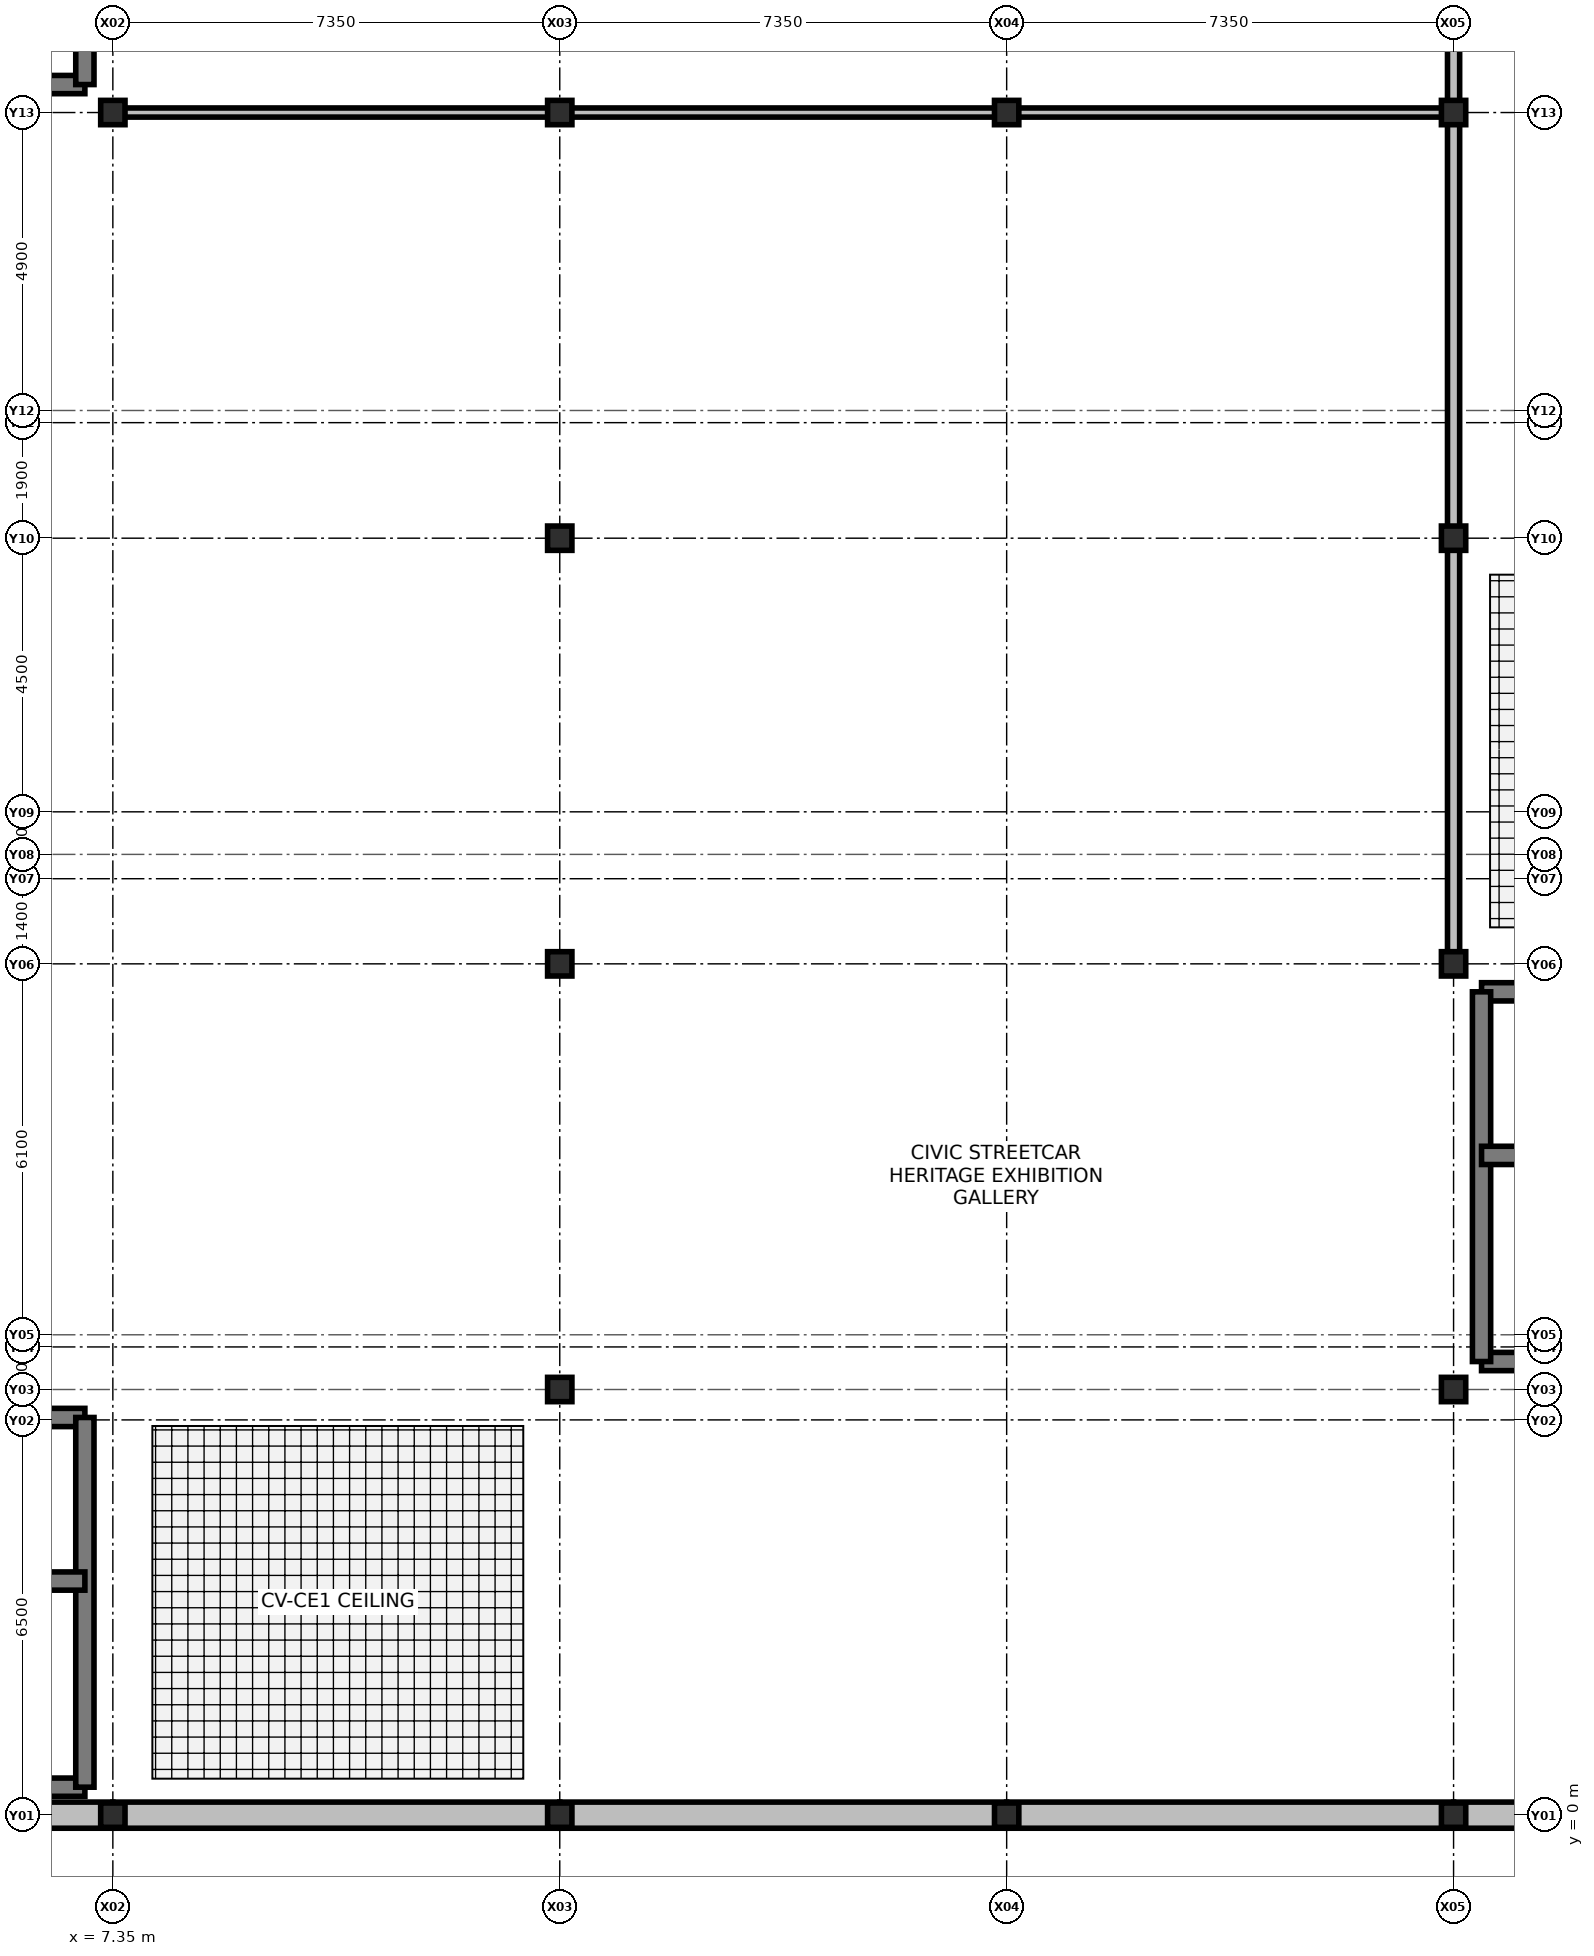
"""IFC4 building model, lengths in metres.
Left out: names, types, materials, properties, quantities, classifications, styles, units other than length and angle.
Written with IfcOpenShell. Run it as: python <this file> out.ifc"""

import sys

from ifc_helpers import new_model, si_unit, direction, frame, frame_2d, origin, origin_with_axes, origin_2d, place, context, subcontext, project, spatial, rectangle, i_section, extrude, element, fill, save


model = new_model("IFC4")
c1 = context("Model", 3, precision=1e-05, world=origin(), true_north=direction((0.0, 1.0)))
c2 = subcontext(c1, "Body", "Model", "MODEL_VIEW")
j1 = project(units=[si_unit("LENGTHUNIT", "METRE"), si_unit("PLANEANGLEUNIT", "RADIAN")], contexts=[c1])
p1 = place(None, origin())
s1 = spatial("IfcSite", under=j1, at=p1, CompositionType="ELEMENT")
p2 = place(p1, origin())
s2 = spatial("IfcBuilding", under=s1, at=p2, CompositionType="ELEMENT")
p3 = place(p2, origin())
s3 = spatial("IfcBuildingStorey", under=s2, at=p3, CompositionType="ELEMENT", Elevation=0.0)
for number, where, z_axis, x_axis in (
    (1, (7.35, 0.0, -0.35), (0.0, 0.0, 1.0), (1.0, 0.0, 0.0)),
    (2, (7.35, 28.0, -0.35), (0.0, 0.0, 1.0), (1.0, 0.0, 0.0)),
    (3, (14.7, 0.0, -0.35), (0.0, 0.0, 1.0), (1.0, 0.0, 0.0)),
    (4, (14.7, 7.0, -0.35), (0.0, 0.0, 1.0), (1.0, 0.0, 0.0)),
    (5, (14.7, 14.0, -0.35), (0.0, 0.0, 1.0), (1.0, 0.0, 0.0)),
    (6, (14.7, 21.0, -0.35), (0.0, 0.0, 1.0), (1.0, 0.0, 0.0)),
    (7, (14.7, 28.0, -0.35), (0.0, 0.0, 1.0), (1.0, 0.0, 0.0)),
    (8, (22.05, 0.0, -0.35), (0.0, 0.0, 1.0), (1.0, 0.0, 0.0)),
    (9, (22.05, 28.0, -0.35), (0.0, 0.0, 1.0), (1.0, 0.0, 0.0)),
    (10, (29.4, 0.0, -0.35), (0.0, 0.0, 1.0), (1.0, 0.0, 0.0)),
    (11, (29.4, 7.0, -0.35), (0.0, 0.0, 1.0), (1.0, 0.0, 0.0)),
    (12, (29.4, 14.0, -0.35), (0.0, 0.0, 1.0), (1.0, 0.0, 0.0)),
    (13, (29.4, 21.0, -0.35), (0.0, 0.0, 1.0), (1.0, 0.0, 0.0)),
    (14, (29.4, 28.0, -0.35), (0.0, 0.0, 1.0), (1.0, 0.0, 0.0)),
):
    element("IfcColumn", number, at=place(p3, frame(where, z_axis=z_axis, x_axis=x_axis)), inside=s3, PredefinedType="COLUMN", context=c2, shape_type="SweptSolid", body=[
        extrude(i_section(OverallWidth=0.4, OverallDepth=0.4, WebThickness=0.013, FlangeThickness=0.021, at=origin_2d()), origin(), (0.0, 0.0, 1.0), 6.35),
    ])
p4 = place(p3, origin_with_axes())
e15 = element("IfcWall", 15, at=p4, inside=s3, PredefinedType="SOLIDWALL", context=c2, shape_type="SweptSolid", body=[
    extrude(rectangle(XDim=7.35, YDim=0.43, at=frame_2d((3.675, 0.0))), origin(), (0.0, 0.0, 1.0), 5.15),
])
p5 = place(p3, frame((7.35, 0.0, 0.0), z_axis=(0.0, 0.0, 1.0), x_axis=(1.0, 0.0, 0.0)))
e16 = element("IfcWall", 16, at=p5, inside=s3, PredefinedType="SOLIDWALL", context=c2, shape_type="SweptSolid", body=[
    extrude(rectangle(XDim=7.35, YDim=0.43, at=frame_2d((3.675, 0.0))), origin(), (0.0, 0.0, 1.0), 5.15),
])
p6 = place(p5, frame((2.75, 0.0, 0.0)))
e17 = element("IfcOpeningElement", 17, at=p6, cuts=e16, PredefinedType="OPENING", context=c2, shape_type="SweptSolid", body=[
    extrude(rectangle(XDim=1.8, YDim=2.4, at=frame_2d((0.9, 1.2))), frame((0.0, 0.225, 0.0), z_axis=(0.0, -1.0, 0.0), x_axis=(1.0, 0.0, 0.0)), (0.0, 0.0, 1.0), 0.45),
])
for number, where, z_axis, x_axis in (
    (18, (14.7, 0.0, 0.0), (0.0, 0.0, 1.0), (1.0, 0.0, 0.0)),
    (19, (22.05, 0.0, 0.0), (0.0, 0.0, 1.0), (1.0, 0.0, 0.0)),
):
    element("IfcWall", number, at=place(p3, frame(where, z_axis=z_axis, x_axis=x_axis)), inside=s3, PredefinedType="SOLIDWALL", context=c2, shape_type="SweptSolid", body=[
        extrude(rectangle(XDim=7.35, YDim=0.43, at=frame_2d((3.675, 0.0))), origin(), (0.0, 0.0, 1.0), 5.15),
    ])
p7 = place(p3, frame((29.4, 0.0, 0.0), z_axis=(0.0, 0.0, 1.0), x_axis=(1.0, 0.0, 0.0)))
e20 = element("IfcWall", 20, at=p7, inside=s3, PredefinedType="SOLIDWALL", context=c2, shape_type="SweptSolid", body=[
    extrude(rectangle(XDim=7.35, YDim=0.43, at=frame_2d((3.675, 0.0))), origin(), (0.0, 0.0, 1.0), 5.15),
])
p8 = place(p7, frame((2.75, 0.0, 0.0)))
e21 = element("IfcOpeningElement", 21, at=p8, cuts=e20, PredefinedType="OPENING", context=c2, shape_type="SweptSolid", body=[
    extrude(rectangle(XDim=1.8, YDim=2.4, at=frame_2d((0.9, 1.2))), frame((0.0, 0.225, 0.0), z_axis=(0.0, -1.0, 0.0), x_axis=(1.0, 0.0, 0.0)), (0.0, 0.0, 1.0), 0.45),
])
p9 = place(p3, frame((0.46, 28.46, -0.35), z_axis=(0.0, 0.0, 1.0), x_axis=(1.0, 0.0, 0.0)))
e22 = element("IfcWall", 22, at=p9, inside=s3, PredefinedType="SHEAR", context=c2, shape_type="SweptSolid", body=[
    extrude(rectangle(XDim=6.43, YDim=0.3, at=frame_2d((3.215, 0.0))), origin(), (0.0, 0.0, 1.0), 6.07),
])
p10 = place(p3, frame((6.89, 28.46, -0.35), z_axis=(0.0, 0.0, 1.0), x_axis=(0.0, 1.0, 0.0)))
e23 = element("IfcWall", 23, at=p10, inside=s3, PredefinedType="SHEAR", context=c2, shape_type="SweptSolid", body=[
    extrude(rectangle(XDim=6.08, YDim=0.3, at=frame_2d((3.04, 0.0))), origin(), (0.0, 0.0, 1.0), 6.07),
])
p11 = place(p3, frame((29.86, 7.46, -0.35), z_axis=(0.0, 0.0, 1.0), x_axis=(1.0, 0.0, 0.0)))
e24 = element("IfcWall", 24, at=p11, inside=s3, PredefinedType="SHEAR", context=c2, shape_type="SweptSolid", body=[
    extrude(rectangle(XDim=6.43, YDim=0.3, at=frame_2d((3.215, 0.0))), origin(), (0.0, 0.0, 1.0), 6.07),
])
p12 = place(p3, frame((29.86, 13.54, -0.35), z_axis=(0.0, 0.0, 1.0), x_axis=(1.0, 0.0, 0.0)))
e25 = element("IfcWall", 25, at=p12, inside=s3, PredefinedType="SHEAR", context=c2, shape_type="SweptSolid", body=[
    extrude(rectangle(XDim=6.43, YDim=0.3, at=frame_2d((3.215, 0.0))), origin(), (0.0, 0.0, 1.0), 6.07),
])
p13 = place(p12, frame((0.55, 0.0, 0.35)))
e26 = element("IfcOpeningElement", 26, at=p13, cuts=e25, PredefinedType="OPENING", context=c2, shape_type="SweptSolid", body=[
    extrude(rectangle(XDim=1.5, YDim=2.2, at=frame_2d((0.75, 1.1))), frame((0.0, 0.16, 0.0), z_axis=(0.0, -1.0, 0.0), x_axis=(1.0, 0.0, 0.0)), (0.0, 0.0, 1.0), 0.32),
])
p14 = place(p3, frame((29.86, 7.46, -0.35), z_axis=(0.0, 0.0, 1.0), x_axis=(0.0, 1.0, 0.0)))
e27 = element("IfcWall", 27, at=p14, inside=s3, PredefinedType="SHEAR", context=c2, shape_type="SweptSolid", body=[
    extrude(rectangle(XDim=6.08, YDim=0.3, at=frame_2d((3.04, 0.0))), origin(), (0.0, 0.0, 1.0), 6.07),
])
p15 = place(p3, frame((29.86, 10.85, -0.35), z_axis=(0.0, 0.0, 1.0), x_axis=(1.0, 0.0, 0.0)))
e28 = element("IfcWall", 28, at=p15, inside=s3, PredefinedType="SHEAR", context=c2, shape_type="SweptSolid", body=[
    extrude(rectangle(XDim=6.43, YDim=0.3, at=frame_2d((3.215, 0.0))), origin(), (0.0, 0.0, 1.0), 6.07),
])
p16 = place(p15, frame((0.185, 0.0, 0.35)))
e29 = element("IfcOpeningElement", 29, at=p16, cuts=e28, PredefinedType="OPENING", context=c2, shape_type="SweptSolid", body=[
    extrude(rectangle(XDim=1.05, YDim=2.15, at=frame_2d((0.525, 1.075))), frame((0.0, 0.16, 0.0), z_axis=(0.0, -1.0, 0.0), x_axis=(1.0, 0.0, 0.0)), (0.0, 0.0, 1.0), 0.32),
])
p17 = place(p3, frame((0.46, 0.46, -0.35), z_axis=(0.0, 0.0, 1.0), x_axis=(1.0, 0.0, 0.0)))
e30 = element("IfcWall", 30, at=p17, inside=s3, PredefinedType="SHEAR", context=c2, shape_type="SweptSolid", body=[
    extrude(rectangle(XDim=6.43, YDim=0.3, at=frame_2d((3.215, 0.0))), origin(), (0.0, 0.0, 1.0), 6.07),
])
p18 = place(p3, frame((0.46, 6.54, -0.35), z_axis=(0.0, 0.0, 1.0), x_axis=(1.0, 0.0, 0.0)))
e31 = element("IfcWall", 31, at=p18, inside=s3, PredefinedType="SHEAR", context=c2, shape_type="SweptSolid", body=[
    extrude(rectangle(XDim=6.43, YDim=0.3, at=frame_2d((3.215, 0.0))), origin(), (0.0, 0.0, 1.0), 6.07),
])
p19 = place(p18, frame((0.55, 0.0, 0.35)))
e32 = element("IfcOpeningElement", 32, at=p19, cuts=e31, PredefinedType="OPENING", context=c2, shape_type="SweptSolid", body=[
    extrude(rectangle(XDim=1.5, YDim=2.2, at=frame_2d((0.75, 1.1))), frame((0.0, 0.16, 0.0), z_axis=(0.0, -1.0, 0.0), x_axis=(1.0, 0.0, 0.0)), (0.0, 0.0, 1.0), 0.32),
])
p20 = place(p3, frame((6.89, 0.46, -0.35), z_axis=(0.0, 0.0, 1.0), x_axis=(0.0, 1.0, 0.0)))
e33 = element("IfcWall", 33, at=p20, inside=s3, PredefinedType="SHEAR", context=c2, shape_type="SweptSolid", body=[
    extrude(rectangle(XDim=6.08, YDim=0.3, at=frame_2d((3.04, 0.0))), origin(), (0.0, 0.0, 1.0), 6.07),
])
p21 = place(p3, frame((0.46, 3.85, -0.35), z_axis=(0.0, 0.0, 1.0), x_axis=(1.0, 0.0, 0.0)))
e34 = element("IfcWall", 34, at=p21, inside=s3, PredefinedType="SHEAR", context=c2, shape_type="SweptSolid", body=[
    extrude(rectangle(XDim=6.43, YDim=0.3, at=frame_2d((3.215, 0.0))), origin(), (0.0, 0.0, 1.0), 6.07),
])
p22 = place(p21, frame((0.185, 0.0, 0.35)))
e35 = element("IfcOpeningElement", 35, at=p22, cuts=e34, PredefinedType="OPENING", context=c2, shape_type="SweptSolid", body=[
    extrude(rectangle(XDim=1.05, YDim=2.15, at=frame_2d((0.525, 1.075))), frame((0.0, 0.16, 0.0), z_axis=(0.0, -1.0, 0.0), x_axis=(1.0, 0.0, 0.0)), (0.0, 0.0, 1.0), 0.32),
])
p23 = place(p3, frame((29.4, 14.0, 0.0), z_axis=(0.0, 0.0, 1.0), x_axis=(0.0, 1.0, 0.0)))
e36 = element("IfcWall", 36, at=p23, inside=s3, PredefinedType="PARTITIONING", context=c2, shape_type="SweptSolid", body=[
    extrude(rectangle(XDim=49.0, YDim=0.2, at=frame_2d((24.5, 0.0))), origin(), (0.0, 0.0, 1.0), 4.35),
])
p24 = place(p23, frame((8.0, 0.0, 0.0)))
e37 = element("IfcOpeningElement", 37, at=p24, cuts=e36, PredefinedType="OPENING", context=c2, shape_type="SweptSolid", body=[
    extrude(rectangle(XDim=1.35, YDim=2.2, at=frame_2d((0.675, 1.1))), frame((0.0, 0.11, 0.0), z_axis=(0.0, -1.0, 0.0), x_axis=(1.0, 0.0, 0.0)), (0.0, 0.0, 1.0), 0.22),
])
p25 = place(p23, frame((17.2, 0.0, 0.0)))
e38 = element("IfcOpeningElement", 38, at=p25, cuts=e36, PredefinedType="OPENING", context=c2, shape_type="SweptSolid", body=[
    extrude(rectangle(XDim=1.4, YDim=2.2, at=frame_2d((0.7, 1.1))), frame((0.0, 0.11, 0.0), z_axis=(0.0, -1.0, 0.0), x_axis=(1.0, 0.0, 0.0)), (0.0, 0.0, 1.0), 0.22),
])
p26 = place(p23, frame((31.0, 0.0, 0.0)))
e39 = element("IfcOpeningElement", 39, at=p26, cuts=e36, PredefinedType="OPENING", context=c2, shape_type="SweptSolid", body=[
    extrude(rectangle(XDim=1.4, YDim=2.2, at=frame_2d((0.7, 1.1))), frame((0.0, 0.11, 0.0), z_axis=(0.0, -1.0, 0.0), x_axis=(1.0, 0.0, 0.0)), (0.0, 0.0, 1.0), 0.22),
])
p27 = place(p3, frame((7.35, 28.0, 0.0), z_axis=(0.0, 0.0, 1.0), x_axis=(1.0, 0.0, 0.0)))
e40 = element("IfcWall", 40, at=p27, inside=s3, PredefinedType="PARTITIONING", context=c2, shape_type="SweptSolid", body=[
    extrude(rectangle(XDim=22.05, YDim=0.15, at=frame_2d((11.025, 0.0))), origin(), (0.0, 0.0, 1.0), 4.35),
])
p28 = place(p27, frame((10.2, 0.0, 0.0)))
e41 = element("IfcOpeningElement", 41, at=p28, cuts=e40, PredefinedType="OPENING", context=c2, shape_type="SweptSolid", body=[
    extrude(rectangle(XDim=1.7, YDim=2.25, at=frame_2d((0.85, 1.125))), frame((0.0, 0.085, 0.0), z_axis=(0.0, -1.0, 0.0), x_axis=(1.0, 0.0, 0.0)), (0.0, 0.0, 1.0), 0.17),
])
p29 = place(p6, frame((1.8, 0.0, 0.0), z_axis=(0.0, 0.0, 1.0), x_axis=(-1.0, 0.0, 0.0)))
e42 = element("IfcDoor", 42, at=p29, inside=s3, OperationType="DOUBLE_DOOR_SINGLE_SWING", PredefinedType="DOOR", context=c2, shape_type="SweptSolid", body=[
    extrude(rectangle(XDim=1.8, YDim=2.4, at=frame_2d((0.9, 1.2))), frame((0.0, 0.025, 0.0), z_axis=(0.0, -1.0, 0.0), x_axis=(1.0, 0.0, 0.0)), (0.0, 0.0, 1.0), 0.05),
])
fill(e17, e42)
p30 = place(p16, origin())
e43 = element("IfcDoor", 43, at=p30, inside=s3, OperationType="SINGLE_SWING_RIGHT", PredefinedType="DOOR", context=c2, shape_type="SweptSolid", body=[
    extrude(rectangle(XDim=1.05, YDim=2.15, at=frame_2d((0.525, 1.075))), frame((0.0, 0.025, 0.0), z_axis=(0.0, -1.0, 0.0), x_axis=(1.0, 0.0, 0.0)), (0.0, 0.0, 1.0), 0.05),
])
fill(e29, e43)
p31 = place(p24, origin())
e44 = element("IfcDoor", 44, at=p31, inside=s3, OperationType="DOUBLE_DOOR_SINGLE_SWING", PredefinedType="DOOR", context=c2, shape_type="SweptSolid", body=[
    extrude(rectangle(XDim=1.35, YDim=2.2, at=frame_2d((0.675, 1.1))), frame((0.0, 0.025, 0.0), z_axis=(0.0, -1.0, 0.0), x_axis=(1.0, 0.0, 0.0)), (0.0, 0.0, 1.0), 0.05),
])
fill(e37, e44)
p32 = place(p28, origin())
e45 = element("IfcDoor", 45, at=p32, inside=s3, OperationType="DOUBLE_DOOR_SINGLE_SWING", PredefinedType="DOOR", context=c2, shape_type="SweptSolid", body=[
    extrude(rectangle(XDim=1.7, YDim=2.25, at=frame_2d((0.85, 1.125))), frame((0.0, 0.025, 0.0), z_axis=(0.0, -1.0, 0.0), x_axis=(1.0, 0.0, 0.0)), (0.0, 0.0, 1.0), 0.05),
])
fill(e41, e45)
save(model, sys.argv[1])
